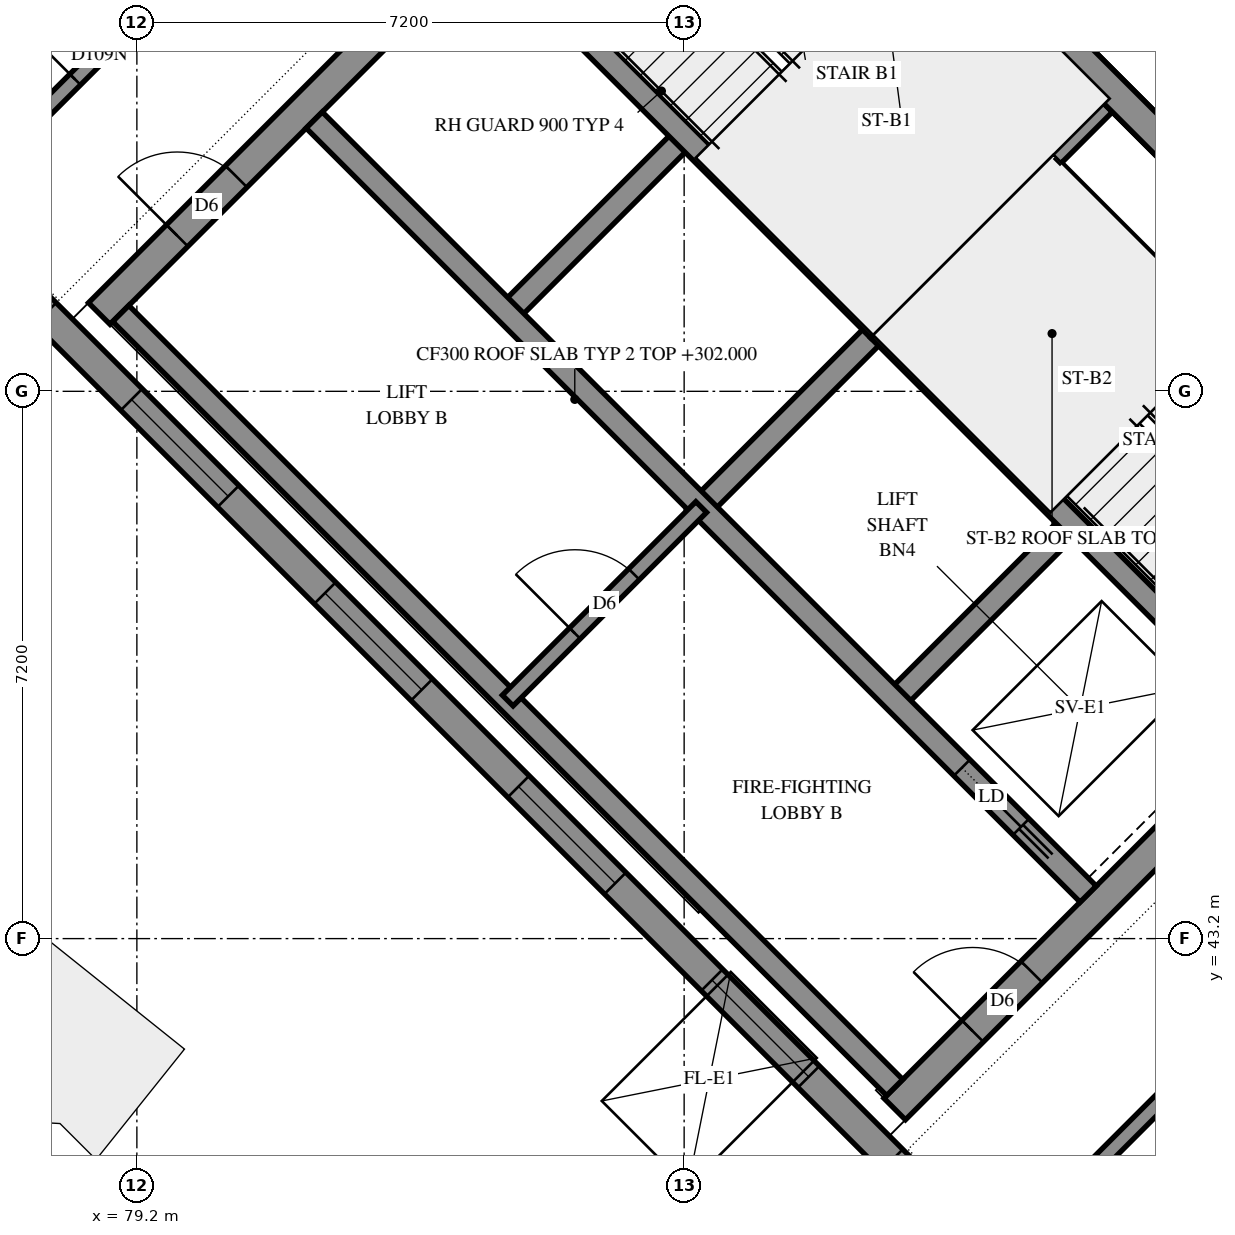
"""IFC4 building model, lengths in metres.
Left out: names, types, materials, properties, quantities, classifications, styles, units other than length and angle.
Written with IfcOpenShell. Run it as: python <this file> out.ifc"""

import sys

from ifc_helpers import new_model, si_unit, direction, frame, frame_2d, origin, place, context, subcontext, project, spatial, polyline, rectangle, outline, extrude, element, fill, save


model = new_model("IFC4")
c1 = context("Model", 3, precision=1e-05, world=origin(), true_north=direction((0.0, 1.0)))
c2 = subcontext(c1, "Body", "Model", "MODEL_VIEW")
j1 = project(units=[si_unit("LENGTHUNIT", "METRE"), si_unit("PLANEANGLEUNIT", "RADIAN")], contexts=[c1])
p1 = place(None, origin())
s1 = spatial("IfcSite", under=j1, at=p1, CompositionType="ELEMENT")
p2 = place(p1, origin())
s2 = spatial("IfcBuilding", under=s1, at=p2, CompositionType="ELEMENT")
p3 = place(p2, frame((0.0, 0.0, 302.0)))
s3 = spatial("IfcBuildingStorey", under=s2, at=p3, CompositionType="ELEMENT", Elevation=302.0)
p4 = place(p3, frame((86.695, 59.696, -0.3), z_axis=(0.0, 0.0, 1.0), x_axis=(0.7071100706, -0.7071034917, 0.0)))
e1 = element("IfcWall", 1, at=p4, inside=s3, PredefinedType="SHEAR", context=c2, shape_type="SweptSolid", body=[
    extrude(outline(polyline([(0.0, 0.0), (15.2, 0.0), (15.2, 3.1), (0.0, 3.1), (0.0, 0.0)])), frame((0.0, 0.2, 0.0), z_axis=(0.0, -1.0, 0.0), x_axis=(1.0, 0.0, 0.0)), (0.0, 0.0, 1.0), 0.4),
])
p5 = place(p4, frame((10.4, 0.0, 0.3)))
e2 = element("IfcOpeningElement", 2, at=p5, cuts=e1, PredefinedType="OPENING", context=c2, shape_type="SweptSolid", body=[
    extrude(rectangle(XDim=0.8, YDim=2.1, at=frame_2d((0.4, 1.05))), frame((0.0, 0.21, 0.0), z_axis=(0.0, -1.0, 0.0), x_axis=(1.0, 0.0, 0.0)), (0.0, 0.0, 1.0), 0.42),
])
p6 = place(p3, frame((78.705, 51.423, -0.3), z_axis=(0.0, 0.0, 1.0), x_axis=(0.7071067812, 0.7071067812, 0.0)))
e3 = element("IfcWall", 3, at=p6, inside=s3, PredefinedType="SHEAR", context=c2, shape_type="SweptSolid", body=[
    extrude(outline(polyline([(0.0, 0.0), (11.3, 0.0), (11.3, 3.1), (0.0, 3.1), (0.0, 0.0)])), frame((0.0, 0.2, 0.0), z_axis=(0.0, -1.0, 0.0), x_axis=(1.0, 0.0, 0.0)), (0.0, 0.0, 1.0), 0.4),
])
p7 = place(p6, frame((1.45, 0.0, 0.3)))
e4 = element("IfcOpeningElement", 4, at=p7, cuts=e3, PredefinedType="OPENING", context=c2, shape_type="SweptSolid", body=[
    extrude(rectangle(XDim=1.1, YDim=2.1, at=frame_2d((0.55, 1.05))), frame((0.0, 0.21, 0.0), z_axis=(0.0, -1.0, 0.0), x_axis=(1.0, 0.0, 0.0)), (0.0, 0.0, 1.0), 0.42),
])
p8 = place(p6, frame((8.25, 0.0, 0.3)))
e5 = element("IfcOpeningElement", 5, at=p8, cuts=e3, PredefinedType="OPENING", context=c2, shape_type="SweptSolid", body=[
    extrude(rectangle(XDim=1.1, YDim=2.1, at=frame_2d((0.55, 1.05))), frame((0.0, 0.21, 0.0), z_axis=(0.0, -1.0, 0.0), x_axis=(1.0, 0.0, 0.0)), (0.0, 0.0, 1.0), 0.42),
])
p9 = place(p3, frame((89.17, 40.958, -0.3), z_axis=(0.0, 0.0, 1.0), x_axis=(0.7071067812, 0.7071067812, 0.0)))
e6 = element("IfcWall", 6, at=p9, inside=s3, PredefinedType="SHEAR", context=c2, shape_type="SweptSolid", body=[
    extrude(outline(polyline([(0.0, 0.0), (11.3, 0.0), (11.3, 3.1), (0.0, 3.1), (0.0, 0.0)])), frame((0.0, 0.2, 0.0), z_axis=(0.0, -1.0, 0.0), x_axis=(1.0, 0.0, 0.0)), (0.0, 0.0, 1.0), 0.4),
])
p10 = place(p9, frame((1.45, 0.0, 0.3)))
e7 = element("IfcOpeningElement", 7, at=p10, cuts=e6, PredefinedType="OPENING", context=c2, shape_type="SweptSolid", body=[
    extrude(rectangle(XDim=1.1, YDim=2.1, at=frame_2d((0.55, 1.05))), frame((0.0, 0.21, 0.0), z_axis=(0.0, -1.0, 0.0), x_axis=(1.0, 0.0, 0.0)), (0.0, 0.0, 1.0), 0.42),
])
p11 = place(p9, frame((8.25, 0.0, 0.3)))
e8 = element("IfcOpeningElement", 8, at=p11, cuts=e6, PredefinedType="OPENING", context=c2, shape_type="SweptSolid", body=[
    extrude(rectangle(XDim=1.1, YDim=2.1, at=frame_2d((0.55, 1.05))), frame((0.0, 0.21, 0.0), z_axis=(0.0, -1.0, 0.0), x_axis=(1.0, 0.0, 0.0)), (0.0, 0.0, 1.0), 0.42),
])
p12 = place(p3, frame((84.079, 51.423, 0.0), z_axis=(0.0, 0.0, 1.0), x_axis=(0.7071219326, 0.7070916295, 0.0)))
e9 = element("IfcWall", 9, at=p12, inside=s3, PredefinedType="SOLIDWALL", context=c2, shape_type="SweptSolid", body=[
    extrude(outline(polyline([(0.0, 0.0), (3.3, 0.0), (3.3, 3.5), (0.0, 3.5), (0.0, 0.0)])), frame((0.0, 0.15, 0.0), z_axis=(0.0, -1.0, 0.0), x_axis=(1.0, 0.0, 0.0)), (0.0, 0.0, 1.0), 0.3),
])
for number, where, z_axis, x_axis in (
    (10, (86.625, 48.878, 0.0), (0.0, 0.0, 1.0), (0.707, 0.707, 0.0)),
    (11, (89.17, 46.332, 0.0), (0.0, 0.0, 1.0), (0.707, 0.707, 0.0)),
):
    element("IfcWall", number, at=place(p3, frame(where, z_axis=z_axis, x_axis=x_axis)), inside=s3, PredefinedType="SOLIDWALL", context=c2, shape_type="SweptSolid", body=[
        extrude(outline(polyline([(0.0, 0.0), (3.3, 0.0), (3.3, 3.5), (0.0, 3.5), (0.0, 0.0)])), frame((0.0, 0.15, 0.0), z_axis=(0.0, -1.0, 0.0), x_axis=(1.0, 0.0, 0.0)), (0.0, 0.0, 1.0), 0.3),
    ])
p13 = place(p3, frame((78.988, 51.423, 0.0), z_axis=(0.0, 0.0, 1.0), x_axis=(0.7071067812, -0.7071067812, 0.0)))
e12 = element("IfcWall", 12, at=p13, inside=s3, PredefinedType="SOLIDWALL", context=c2, shape_type="SweptSolid", body=[
    extrude(outline(polyline([(0.0, 0.0), (14.4, 0.0), (14.4, 3.5), (0.0, 3.5), (0.0, 0.0)])), frame((0.0, 0.15, 0.0), z_axis=(0.0, -1.0, 0.0), x_axis=(1.0, 0.0, 0.0)), (0.0, 0.0, 1.0), 0.3),
])
p14 = place(p3, frame((81.534, 53.969, 0.0), z_axis=(0.0, 0.0, 1.0), x_axis=(0.707103309, -0.7071102534, 0.0)))
e13 = element("IfcWall", 13, at=p14, inside=s3, PredefinedType="SOLIDWALL", context=c2, shape_type="SweptSolid", body=[
    extrude(outline(polyline([(0.0, 0.0), (14.4, 0.0), (14.4, 3.5), (0.0, 3.5), (0.0, 0.0)])), frame((0.0, 0.15, 0.0), z_axis=(0.0, -1.0, 0.0), x_axis=(1.0, 0.0, 0.0)), (0.0, 0.0, 1.0), 0.3),
])
p15 = place(p14, frame((12.05, 0.0, 0.0)))
e14 = element("IfcOpeningElement", 14, at=p15, cuts=e13, PredefinedType="OPENING", context=c2, shape_type="SweptSolid", body=[
    extrude(rectangle(XDim=1.1, YDim=2.1, at=frame_2d((0.55, 1.05))), frame((0.0, 0.16, 0.0), z_axis=(0.0, -1.0, 0.0), x_axis=(1.0, 0.0, 0.0)), (0.0, 0.0, 1.0), 0.32),
])
for number, where, z_axis, x_axis in (
    (15, (83.867, 56.302, 0.0), (0.0, 0.0, 1.0), (0.707, -0.707, 0.0)),
    (16, (88.958, 51.211, 0.0), (0.0, 0.0, 1.0), (0.707, -0.707, 0.0)),
):
    element("IfcWall", number, at=place(p3, frame(where, z_axis=z_axis, x_axis=x_axis)), inside=s3, PredefinedType="SOLIDWALL", context=c2, shape_type="SweptSolid", body=[
        extrude(outline(polyline([(0.0, 0.0), (7.2, 0.0), (7.2, 3.5), (0.0, 3.5), (0.0, 0.0)])), frame((0.0, 0.15, 0.0), z_axis=(0.0, -1.0, 0.0), x_axis=(1.0, 0.0, 0.0)), (0.0, 0.0, 1.0), 0.3),
    ])
p16 = place(p3, frame((88.958, 51.211, 0.0), z_axis=(0.0, 0.0, 1.0), x_axis=(0.7071067812, 0.7071067812, 0.0)))
e17 = element("IfcWall", 17, at=p16, inside=s3, PredefinedType="SOLIDWALL", context=c2, shape_type="SweptSolid", body=[
    extrude(outline(polyline([(0.0, 0.0), (4.2, 0.0), (4.2, 3.5), (0.0, 3.5), (0.0, 0.0)])), frame((0.0, 0.15, 0.0), z_axis=(0.0, -1.0, 0.0), x_axis=(1.0, 0.0, 0.0)), (0.0, 0.0, 1.0), 0.3),
])
p17 = place(p3, frame((72.821, 56.6, 0.0), z_axis=(0.0, 0.0, 1.0), x_axis=(0.7071067812, -0.7071067812, 0.0)))
e18 = element("IfcWall", 18, at=p17, inside=s3, PredefinedType="SOLIDWALL", context=c2, shape_type="SweptSolid", body=[
    extrude(outline(polyline([(0.083, -0.2), (30.821, -0.2), (30.421, 0.2), (-0.083, 0.2), (0.083, -0.2)])), origin(), (0.0, 0.0, 1.0), 3.5),
])
p18 = place(p17, frame((2.421, 0.0, 0.7)))
e19 = element("IfcOpeningElement", 19, at=p18, cuts=e18, PredefinedType="OPENING", context=c2, shape_type="SweptSolid", body=[
    extrude(rectangle(XDim=1.8, YDim=2.2, at=frame_2d((0.9, 1.1))), frame((0.0, 0.21, 0.0), z_axis=(0.0, -1.0, 0.0), x_axis=(1.0, 0.0, 0.0)), (0.0, 0.0, 1.0), 0.42),
])
p19 = place(p17, frame((5.521, 0.0, 0.7)))
e20 = element("IfcOpeningElement", 20, at=p19, cuts=e18, PredefinedType="OPENING", context=c2, shape_type="SweptSolid", body=[
    extrude(rectangle(XDim=1.8, YDim=2.2, at=frame_2d((0.9, 1.1))), frame((0.0, 0.21, 0.0), z_axis=(0.0, -1.0, 0.0), x_axis=(1.0, 0.0, 0.0)), (0.0, 0.0, 1.0), 0.42),
])
p20 = place(p17, frame((8.921, 0.0, 0.7)))
e21 = element("IfcOpeningElement", 21, at=p20, cuts=e18, PredefinedType="OPENING", context=c2, shape_type="SweptSolid", body=[
    extrude(rectangle(XDim=1.8, YDim=2.2, at=frame_2d((0.9, 1.1))), frame((0.0, 0.21, 0.0), z_axis=(0.0, -1.0, 0.0), x_axis=(1.0, 0.0, 0.0)), (0.0, 0.0, 1.0), 0.42),
])
p21 = place(p17, frame((12.521, 0.0, 0.7)))
e22 = element("IfcOpeningElement", 22, at=p21, cuts=e18, PredefinedType="OPENING", context=c2, shape_type="SweptSolid", body=[
    extrude(rectangle(XDim=1.8, YDim=2.2, at=frame_2d((0.9, 1.1))), frame((0.0, 0.21, 0.0), z_axis=(0.0, -1.0, 0.0), x_axis=(1.0, 0.0, 0.0)), (0.0, 0.0, 1.0), 0.42),
])
p22 = place(p17, frame((16.121, 0.0, 0.7)))
e23 = element("IfcOpeningElement", 23, at=p22, cuts=e18, PredefinedType="OPENING", context=c2, shape_type="SweptSolid", body=[
    extrude(rectangle(XDim=1.8, YDim=2.2, at=frame_2d((0.9, 1.1))), frame((0.0, 0.21, 0.0), z_axis=(0.0, -1.0, 0.0), x_axis=(1.0, 0.0, 0.0)), (0.0, 0.0, 1.0), 0.42),
])
p23 = place(p17, frame((19.721, 0.0, 0.7)))
e24 = element("IfcOpeningElement", 24, at=p23, cuts=e18, PredefinedType="OPENING", context=c2, shape_type="SweptSolid", body=[
    extrude(rectangle(XDim=1.8, YDim=2.2, at=frame_2d((0.9, 1.1))), frame((0.0, 0.21, 0.0), z_axis=(0.0, -1.0, 0.0), x_axis=(1.0, 0.0, 0.0)), (0.0, 0.0, 1.0), 0.42),
])
p24 = place(p17, frame((23.071, 0.0, 0.7)))
e25 = element("IfcOpeningElement", 25, at=p24, cuts=e18, PredefinedType="OPENING", context=c2, shape_type="SweptSolid", body=[
    extrude(rectangle(XDim=1.8, YDim=2.2, at=frame_2d((0.9, 1.1))), frame((0.0, 0.21, 0.0), z_axis=(0.0, -1.0, 0.0), x_axis=(1.0, 0.0, 0.0)), (0.0, 0.0, 1.0), 0.42),
])
p25 = place(p17, frame((26.921, 0.0, 0.7)))
e26 = element("IfcOpeningElement", 26, at=p25, cuts=e18, PredefinedType="OPENING", context=c2, shape_type="SweptSolid", body=[
    extrude(rectangle(XDim=1.8, YDim=2.2, at=frame_2d((0.9, 1.1))), frame((0.0, 0.21, 0.0), z_axis=(0.0, -1.0, 0.0), x_axis=(1.0, 0.0, 0.0)), (0.0, 0.0, 1.0), 0.42),
])
p26 = place(p3, frame((91.313, 53.354, 0.0), z_axis=(0.0, 0.0, 1.0), x_axis=(0.7071147811, -0.7070987812, 0.0)))
e27 = element("IfcWall", 27, at=p26, inside=s3, PredefinedType="PARTITIONING", context=c2, shape_type="SweptSolid", body=[
    extrude(outline(polyline([(0.0, 0.0), (6.25, 0.0), (6.25, 3.5), (0.0, 3.5), (0.0, 0.0)])), frame((0.0, 0.075, 0.0), z_axis=(0.0, -1.0, 0.0), x_axis=(1.0, 0.0, 0.0)), (0.0, 0.0, 1.0), 0.15),
])
p27 = place(p3, frame((84.079, 46.332, 0.0), z_axis=(0.0, 0.0, 1.0), x_axis=(0.7071067812, 0.7071067812, 0.0)))
e28 = element("IfcWall", 28, at=p27, inside=s3, PredefinedType="PARTITIONING", context=c2, shape_type="SweptSolid", body=[
    extrude(outline(polyline([(0.0, 0.0), (3.6, 0.0), (3.6, 3.5), (0.0, 3.5), (0.0, 0.0)])), frame((0.0, 0.1, 0.0), z_axis=(0.0, -1.0, 0.0), x_axis=(1.0, 0.0, 0.0)), (0.0, 0.0, 1.0), 0.2),
])
p28 = place(p27, frame((1.25, 0.0, 0.0)))
e29 = element("IfcOpeningElement", 29, at=p28, cuts=e28, PredefinedType="OPENING", context=c2, shape_type="SweptSolid", body=[
    extrude(rectangle(XDim=1.1, YDim=2.1, at=frame_2d((0.55, 1.05))), frame((0.0, 0.11, 0.0), z_axis=(0.0, -1.0, 0.0), x_axis=(1.0, 0.0, 0.0)), (0.0, 0.0, 1.0), 0.22),
])
p29 = place(p3, frame((86.833, 62.947, 0.0), z_axis=(0.0, 0.0, 1.0), x_axis=(0.7071067812, -0.7071067812, 0.0)))
e30 = element("IfcWall", 30, at=p29, inside=s3, PredefinedType="PARTITIONING", context=c2, shape_type="SweptSolid", body=[
    extrude(rectangle(XDim=19.601, YDim=0.2, at=frame_2d((9.8, 0.0))), origin(), (0.0, 0.0, 1.0), 3.5),
])
p30 = place(p29, frame((10.386, 0.0, 0.0)))
e31 = element("IfcOpeningElement", 31, at=p30, cuts=e30, PredefinedType="OPENING", context=c2, shape_type="SweptSolid", body=[
    extrude(rectangle(XDim=1.0, YDim=2.1, at=frame_2d((0.5, 1.05))), frame((0.0, 0.11, 0.0), z_axis=(0.0, -1.0, 0.0), x_axis=(1.0, 0.0, 0.0)), (0.0, 0.0, 1.0), 0.22),
])
p31 = place(p3, frame((90.654, 39.05, 0.0), z_axis=(0.0, 0.0, 1.0), x_axis=(0.7071067812, 0.7071067812, 0.0)))
e32 = element("IfcWall", 32, at=p31, inside=s3, PredefinedType="PARTITIONING", context=c2, shape_type="SweptSolid", body=[
    extrude(rectangle(XDim=3.299, YDim=0.2, at=frame_2d((1.65, 0.0))), origin(), (0.0, 0.0, 1.0), 3.5),
])
p32 = place(p3, frame((76.795, 52.909, 0.0), z_axis=(0.0, 0.0, 1.0), x_axis=(0.7071067812, 0.7071067812, 0.0)))
e33 = element("IfcWall", 33, at=p32, inside=s3, PredefinedType="PARTITIONING", context=c2, shape_type="SweptSolid", body=[
    extrude(rectangle(XDim=3.298, YDim=0.2, at=frame_2d((1.649, 0.0))), origin(), (0.0, 0.0, 1.0), 3.5),
])
p33 = place(p32, frame((2.254, 0.0, 0.0)))
e34 = element("IfcOpeningElement", 34, at=p33, cuts=e33, PredefinedType="OPENING", context=c2, shape_type="SweptSolid", body=[
    extrude(rectangle(XDim=0.9, YDim=2.1, at=frame_2d((0.45, 1.05))), frame((0.0, 0.11, 0.0), z_axis=(0.0, -1.0, 0.0), x_axis=(1.0, 0.0, 0.0)), (0.0, 0.0, 1.0), 0.22),
])
p34 = place(p20, origin())
e35 = element("IfcWindow", 35, at=p34, inside=s3, PartitioningType="SINGLE_PANEL", PredefinedType="WINDOW", context=c2, shape_type="SweptSolid", body=[
    extrude(rectangle(XDim=1.8, YDim=2.2, at=frame_2d((0.9, 1.1))), frame((0.0, 0.08, 0.0), z_axis=(0.0, -1.0, 0.0), x_axis=(1.0, 0.0, 0.0)), (0.0, 0.0, 1.0), 0.06),
])
fill(e21, e35)
p35 = place(p21, origin())
e36 = element("IfcWindow", 36, at=p35, inside=s3, PartitioningType="SINGLE_PANEL", PredefinedType="WINDOW", context=c2, shape_type="SweptSolid", body=[
    extrude(rectangle(XDim=1.8, YDim=2.2, at=frame_2d((0.9, 1.1))), frame((0.0, 0.08, 0.0), z_axis=(0.0, -1.0, 0.0), x_axis=(1.0, 0.0, 0.0)), (0.0, 0.0, 1.0), 0.06),
])
fill(e22, e36)
p36 = place(p22, origin())
e37 = element("IfcWindow", 37, at=p36, inside=s3, PartitioningType="SINGLE_PANEL", PredefinedType="WINDOW", context=c2, shape_type="SweptSolid", body=[
    extrude(rectangle(XDim=1.8, YDim=2.2, at=frame_2d((0.9, 1.1))), frame((0.0, 0.08, 0.0), z_axis=(0.0, -1.0, 0.0), x_axis=(1.0, 0.0, 0.0)), (0.0, 0.0, 1.0), 0.06),
])
fill(e23, e37)
p37 = place(p23, origin())
e38 = element("IfcWindow", 38, at=p37, inside=s3, PartitioningType="SINGLE_PANEL", PredefinedType="WINDOW", context=c2, shape_type="SweptSolid", body=[
    extrude(rectangle(XDim=1.8, YDim=2.2, at=frame_2d((0.9, 1.1))), frame((0.0, 0.08, 0.0), z_axis=(0.0, -1.0, 0.0), x_axis=(1.0, 0.0, 0.0)), (0.0, 0.0, 1.0), 0.06),
])
fill(e24, e38)
p38 = place(p7, origin())
e39 = element("IfcDoor", 39, at=p38, inside=s3, OperationType="DOUBLE_DOOR_SINGLE_SWING", PredefinedType="DOOR", context=c2, shape_type="SweptSolid", body=[
    extrude(rectangle(XDim=1.1, YDim=2.1, at=frame_2d((0.55, 1.05))), frame((0.0, 0.025, 0.0), z_axis=(0.0, -1.0, 0.0), x_axis=(1.0, 0.0, 0.0)), (0.0, 0.0, 1.0), 0.05),
])
fill(e4, e39)
p39 = place(p10, origin())
e40 = element("IfcDoor", 40, at=p39, inside=s3, OperationType="DOUBLE_DOOR_SINGLE_SWING", PredefinedType="DOOR", context=c2, shape_type="SweptSolid", body=[
    extrude(rectangle(XDim=1.1, YDim=2.1, at=frame_2d((0.55, 1.05))), frame((0.0, 0.025, 0.0), z_axis=(0.0, -1.0, 0.0), x_axis=(1.0, 0.0, 0.0)), (0.0, 0.0, 1.0), 0.05),
])
fill(e7, e40)
p40 = place(p28, origin())
e41 = element("IfcDoor", 41, at=p40, inside=s3, OperationType="DOUBLE_DOOR_SINGLE_SWING", PredefinedType="DOOR", context=c2, shape_type="SweptSolid", body=[
    extrude(rectangle(XDim=1.1, YDim=2.1, at=frame_2d((0.55, 1.05))), frame((0.0, 0.025, 0.0), z_axis=(0.0, -1.0, 0.0), x_axis=(1.0, 0.0, 0.0)), (0.0, 0.0, 1.0), 0.05),
])
fill(e29, e41)
p41 = place(p15, origin())
e42 = element("IfcDoor", 42, at=p41, inside=s3, OperationType="SLIDING_TO_RIGHT", PredefinedType="DOOR", context=c2, shape_type="SweptSolid", body=[
    extrude(rectangle(XDim=1.1, YDim=2.1, at=frame_2d((0.55, 1.05))), frame((0.0, 0.025, 0.0), z_axis=(0.0, -1.0, 0.0), x_axis=(1.0, 0.0, 0.0)), (0.0, 0.0, 1.0), 0.05),
])
fill(e14, e42)
p42 = place(p33, origin())
e43 = element("IfcDoor", 43, at=p42, inside=s3, OperationType="SINGLE_SWING_LEFT", PredefinedType="DOOR", context=c2, shape_type="SweptSolid", body=[
    extrude(rectangle(XDim=0.9, YDim=2.1, at=frame_2d((0.45, 1.05))), frame((0.0, 0.025, 0.0), z_axis=(0.0, -1.0, 0.0), x_axis=(1.0, 0.0, 0.0)), (0.0, 0.0, 1.0), 0.05),
])
fill(e34, e43)
save(model, sys.argv[1])
